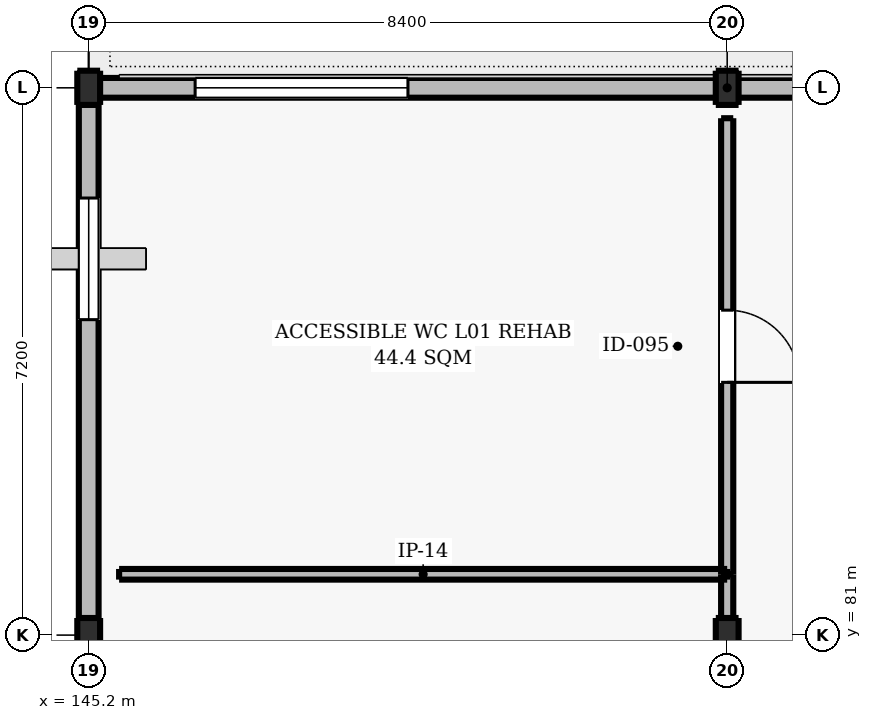
"""IFC4 building model, lengths in metres.
Left out: names, types, materials, properties, quantities, classifications, styles, units other than length and angle.
Written with IfcOpenShell. Run it as: python <this file> out.ifc"""

import sys

from ifc_helpers import new_model, si_unit, direction, frame, frame_2d, origin, origin_2d, place, context, subcontext, project, spatial, rectangle, i_section, extrude, element, fill, save


model = new_model("IFC4")
c1 = context("Model", 3, precision=1e-05, world=origin(), true_north=direction((0.0, 1.0)))
c2 = subcontext(c1, "Body", "Model", "MODEL_VIEW")
j1 = project(units=[si_unit("LENGTHUNIT", "METRE"), si_unit("PLANEANGLEUNIT", "RADIAN")], contexts=[c1])
p1 = place(None, origin())
s1 = spatial("IfcSite", under=j1, at=p1, CompositionType="ELEMENT")
p2 = place(p1, origin())
s2 = spatial("IfcBuilding", under=s1, at=p2, CompositionType="ELEMENT")
p3 = place(p2, frame((0.0, 0.0, 5.1)))
s3 = spatial("IfcBuildingStorey", under=s2, at=p3, CompositionType="ELEMENT", Elevation=5.1)
for number, where, z_axis, x_axis in (
    (1, (145.2, 81.0, 0.0), (0.0, 0.0, 1.0), (1.0, 0.0, 0.0)),
    (2, (145.2, 88.2, 0.0), (0.0, 0.0, 1.0), (1.0, 0.0, 0.0)),
    (3, (153.6, 81.0, 0.0), (0.0, 0.0, 1.0), (1.0, 0.0, 0.0)),
    (4, (153.6, 88.2, 0.0), (0.0, 0.0, 1.0), (1.0, 0.0, 0.0)),
):
    element("IfcColumn", number, at=place(p3, frame(where, z_axis=z_axis, x_axis=x_axis)), inside=s3, PredefinedType="COLUMN", context=c2, shape_type="SweptSolid", body=[
        extrude(i_section(OverallWidth=0.3, OverallDepth=0.45, WebThickness=0.014, FlangeThickness=0.026, FilletRadius=0.027, at=origin_2d()), origin(), (0.0, 0.0, 1.0), 4.5),
    ])
p4 = place(p3, frame((145.2, 52.2, 0.0), z_axis=(0.0, 0.0, 1.0), x_axis=(0.0, 1.0, 0.0)))
e5 = element("IfcWall", 5, at=p4, inside=s3, PredefinedType="SOLIDWALL", context=c2, shape_type="SweptSolid", body=[
    extrude(rectangle(XDim=36.0, YDim=0.26, at=frame_2d((18.0, 0.0))), origin(), (0.0, 0.0, 1.0), 3.72),
])
p5 = place(p4, frame((1.45, 0.0, 1.06)))
e6 = element("IfcOpeningElement", 6, at=p5, cuts=e5, PredefinedType="OPENING", context=c2, shape_type="SweptSolid", body=[
    extrude(rectangle(XDim=1.6, YDim=1.6, at=frame_2d((0.8, 0.8))), frame((0.0, 0.14, 0.0), z_axis=(0.0, -1.0, 0.0), x_axis=(1.0, 0.0, 0.0)), (0.0, 0.0, 1.0), 0.28),
])
p6 = place(p4, frame((5.95, 0.0, 1.06)))
e7 = element("IfcOpeningElement", 7, at=p6, cuts=e5, PredefinedType="OPENING", context=c2, shape_type="SweptSolid", body=[
    extrude(rectangle(XDim=1.6, YDim=1.6, at=frame_2d((0.8, 0.8))), frame((0.0, 0.14, 0.0), z_axis=(0.0, -1.0, 0.0), x_axis=(1.0, 0.0, 0.0)), (0.0, 0.0, 1.0), 0.28),
])
p7 = place(p4, frame((10.45, 0.0, 1.06)))
e8 = element("IfcOpeningElement", 8, at=p7, cuts=e5, PredefinedType="OPENING", context=c2, shape_type="SweptSolid", body=[
    extrude(rectangle(XDim=1.6, YDim=1.6, at=frame_2d((0.8, 0.8))), frame((0.0, 0.14, 0.0), z_axis=(0.0, -1.0, 0.0), x_axis=(1.0, 0.0, 0.0)), (0.0, 0.0, 1.0), 0.28),
])
p8 = place(p4, frame((14.95, 0.0, 1.06)))
e9 = element("IfcOpeningElement", 9, at=p8, cuts=e5, PredefinedType="OPENING", context=c2, shape_type="SweptSolid", body=[
    extrude(rectangle(XDim=1.6, YDim=1.6, at=frame_2d((0.8, 0.8))), frame((0.0, 0.14, 0.0), z_axis=(0.0, -1.0, 0.0), x_axis=(1.0, 0.0, 0.0)), (0.0, 0.0, 1.0), 0.28),
])
p9 = place(p4, frame((23.95, 0.0, 1.06)))
e10 = element("IfcOpeningElement", 10, at=p9, cuts=e5, PredefinedType="OPENING", context=c2, shape_type="SweptSolid", body=[
    extrude(rectangle(XDim=1.6, YDim=1.6, at=frame_2d((0.8, 0.8))), frame((0.0, 0.14, 0.0), z_axis=(0.0, -1.0, 0.0), x_axis=(1.0, 0.0, 0.0)), (0.0, 0.0, 1.0), 0.28),
])
p10 = place(p4, frame((32.95, 0.0, 1.06)))
e11 = element("IfcOpeningElement", 11, at=p10, cuts=e5, PredefinedType="OPENING", context=c2, shape_type="SweptSolid", body=[
    extrude(rectangle(XDim=1.6, YDim=1.6, at=frame_2d((0.8, 0.8))), frame((0.0, 0.14, 0.0), z_axis=(0.0, -1.0, 0.0), x_axis=(1.0, 0.0, 0.0)), (0.0, 0.0, 1.0), 0.28),
])
p11 = place(p3, frame((145.2, 88.2, 0.0), z_axis=(0.0, 0.0, 1.0), x_axis=(1.0, 0.0, 0.0)))
e12 = element("IfcWall", 12, at=p11, inside=s3, PredefinedType="SOLIDWALL", context=c2, shape_type="SweptSolid", body=[
    extrude(rectangle(XDim=16.8, YDim=0.26, at=frame_2d((8.4, 0.0))), origin(), (0.0, 0.0, 1.0), 3.83),
])
p12 = place(p11, frame((1.4, 0.0, 0.95)))
e13 = element("IfcOpeningElement", 13, at=p12, cuts=e12, PredefinedType="OPENING", context=c2, shape_type="SweptSolid", body=[
    extrude(rectangle(XDim=2.8, YDim=1.8, at=frame_2d((1.4, 0.9))), frame((0.0, 0.14, 0.0), z_axis=(0.0, -1.0, 0.0), x_axis=(1.0, 0.0, 0.0)), (0.0, 0.0, 1.0), 0.28),
])
p13 = place(p11, frame((12.6, 0.0, 0.95)))
e14 = element("IfcOpeningElement", 14, at=p13, cuts=e12, PredefinedType="OPENING", context=c2, shape_type="SweptSolid", body=[
    extrude(rectangle(XDim=2.8, YDim=1.8, at=frame_2d((1.4, 0.9))), frame((0.0, 0.14, 0.0), z_axis=(0.0, -1.0, 0.0), x_axis=(1.0, 0.0, 0.0)), (0.0, 0.0, 1.0), 0.28),
])
p14 = place(p3, frame((153.6, 70.4, 0.0), z_axis=(0.0, 0.0, 1.0), x_axis=(0.0, 1.0, 0.0)))
e15 = element("IfcWall", 15, at=p14, inside=s3, PredefinedType="PARTITIONING", context=c2, shape_type="SweptSolid", body=[
    extrude(rectangle(XDim=11.4, YDim=0.16, at=frame_2d((5.7, 0.0))), origin(), (0.0, 0.0, 1.0), 3.72),
])
p15 = place(p14, frame((5.1, 0.0, 0.0)))
e16 = element("IfcOpeningElement", 16, at=p15, cuts=e15, PredefinedType="OPENING", context=c2, shape_type="SweptSolid", body=[
    extrude(rectangle(XDim=1.2, YDim=2.2, at=frame_2d((0.6, 1.1))), frame((0.0, 0.09, 0.0), z_axis=(0.0, -1.0, 0.0), x_axis=(1.0, 0.0, 0.0)), (0.0, 0.0, 1.0), 0.18),
])
p16 = place(p3, frame((145.6, 81.8, 0.0), z_axis=(0.0, 0.0, 1.0), x_axis=(1.0, 0.0, 0.0)))
e17 = element("IfcWall", 17, at=p16, inside=s3, PredefinedType="PARTITIONING", context=c2, shape_type="SweptSolid", body=[
    extrude(rectangle(XDim=8.0, YDim=0.14, at=frame_2d((4.0, 0.0))), origin(), (0.0, 0.0, 1.0), 4.21),
])
p17 = place(p3, frame((153.6, 81.8, 0.0), z_axis=(0.0, 0.0, 1.0), x_axis=(0.0, 1.0, 0.0)))
e18 = element("IfcWall", 18, at=p17, inside=s3, PredefinedType="PARTITIONING", context=c2, shape_type="SweptSolid", body=[
    extrude(rectangle(XDim=6.0, YDim=0.16, at=frame_2d((3.0, 0.0))), origin(), (0.0, 0.0, 1.0), 3.86),
])
p18 = place(p17, frame((2.525, 0.0, 0.0)))
e19 = element("IfcOpeningElement", 19, at=p18, cuts=e18, PredefinedType="OPENING", context=c2, shape_type="SweptSolid", body=[
    extrude(rectangle(XDim=0.95, YDim=2.1, at=frame_2d((0.475, 1.05))), frame((0.0, 0.09, 0.0), z_axis=(0.0, -1.0, 0.0), x_axis=(1.0, 0.0, 0.0)), (0.0, 0.0, 1.0), 0.18),
])
p19 = place(p10, origin())
e20 = element("IfcWindow", 20, at=p19, inside=s3, PartitioningType="SINGLE_PANEL", PredefinedType="WINDOW", context=c2, shape_type="SweptSolid", body=[
    extrude(rectangle(XDim=1.6, YDim=1.6, at=frame_2d((0.8, 0.8))), frame((0.0, 0.03, 0.0), z_axis=(0.0, -1.0, 0.0), x_axis=(1.0, 0.0, 0.0)), (0.0, 0.0, 1.0), 0.06),
])
fill(e11, e20)
p20 = place(p12, origin())
e21 = element("IfcWindow", 21, at=p20, inside=s3, PartitioningType="SINGLE_PANEL", PredefinedType="WINDOW", context=c2, shape_type="SweptSolid", body=[
    extrude(rectangle(XDim=2.8, YDim=1.8, at=frame_2d((1.4, 0.9))), frame((0.0, 0.03, 0.0), z_axis=(0.0, -1.0, 0.0), x_axis=(1.0, 0.0, 0.0)), (0.0, 0.0, 1.0), 0.06),
])
fill(e13, e21)
p21 = place(p18, frame((0.95, 0.0, 0.0), z_axis=(0.0, 0.0, 1.0), x_axis=(-1.0, 0.0, 0.0)))
e22 = element("IfcDoor", 22, at=p21, inside=s3, OperationType="SINGLE_SWING_LEFT", PredefinedType="DOOR", context=c2, shape_type="SweptSolid", body=[
    extrude(rectangle(XDim=0.95, YDim=2.1, at=frame_2d((0.475, 1.05))), frame((0.0, 0.025, 0.0), z_axis=(0.0, -1.0, 0.0), x_axis=(1.0, 0.0, 0.0)), (0.0, 0.0, 1.0), 0.05),
])
fill(e19, e22)
save(model, sys.argv[1])
